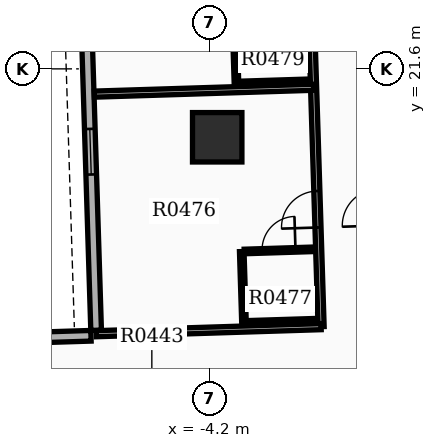
"""IFC4 building model, lengths in metres.
Left out: names, types, materials, properties, quantities, classifications, styles, units other than length and angle.
Written with IfcOpenShell. Run it as: python <this file> out.ifc"""

import sys

from ifc_helpers import new_model, si_unit, direction, frame, frame_2d, origin, origin_2d, place, context, subcontext, project, spatial, rectangle, extrude, element, fill, save


model = new_model("IFC4")
c1 = context("Model", 3, precision=1e-05, world=origin(), true_north=direction((0.0, 1.0)))
c2 = subcontext(c1, "Body", "Model", "MODEL_VIEW")
j1 = project(units=[si_unit("LENGTHUNIT", "METRE"), si_unit("PLANEANGLEUNIT", "RADIAN")], contexts=[c1])
p1 = place(None, origin())
s1 = spatial("IfcSite", under=j1, at=p1, CompositionType="ELEMENT")
p2 = place(p1, origin())
s2 = spatial("IfcBuilding", under=s1, at=p2, CompositionType="ELEMENT")
p3 = place(p2, frame((0.0, 0.0, 31.5)))
s3 = spatial("IfcBuildingStorey", under=s2, at=p3, CompositionType="ELEMENT", Elevation=31.5)
p4 = place(p3, frame((-4.0, 19.8, 0.0), z_axis=(0.0, 0.0, 1.0), x_axis=(1.0, 0.0, 0.0)))
e1 = element("IfcColumn", 1, at=p4, inside=s3, PredefinedType="COLUMN", context=c2, shape_type="SweptSolid", body=[
    extrude(rectangle(XDim=1.3, YDim=1.3, at=origin_2d()), origin(), (0.0, 0.0, 1.0), 3.9),
])
p5 = place(p3, frame((-7.817, 34.812, 0.0), z_axis=(0.0, 0.0, 1.0), x_axis=(0.031410322165, -0.999506574096, 0.0)))
e2 = element("IfcWall", 2, at=p5, inside=s3, PredefinedType="STANDARD", context=c2, shape_type="SweptSolid", body=[
    extrude(rectangle(XDim=20.1, YDim=0.28, at=frame_2d((10.05, 0.0))), origin(), (0.0, 0.0, 1.0), 2.91),
])
p6 = place(p5, frame((0.85, 0.0, 0.8)))
e3 = element("IfcOpeningElement", 3, at=p6, cuts=e2, PredefinedType="OPENING", context=c2, shape_type="SweptSolid", body=[
    extrude(rectangle(XDim=1.2, YDim=1.6, at=frame_2d((0.6, 0.8))), frame((0.0, 0.15, 0.0), z_axis=(0.0, -1.0, 0.0), x_axis=(1.0, 0.0, 0.0)), (0.0, 0.0, 1.0), 0.3),
])
p7 = place(p5, frame((4.05, 0.0, 0.8)))
e4 = element("IfcOpeningElement", 4, at=p7, cuts=e2, PredefinedType="OPENING", context=c2, shape_type="SweptSolid", body=[
    extrude(rectangle(XDim=1.2, YDim=1.6, at=frame_2d((0.6, 0.8))), frame((0.0, 0.15, 0.0), z_axis=(0.0, -1.0, 0.0), x_axis=(1.0, 0.0, 0.0)), (0.0, 0.0, 1.0), 0.3),
])
p8 = place(p5, frame((7.5, 0.0, 0.8)))
e5 = element("IfcOpeningElement", 5, at=p8, cuts=e2, PredefinedType="OPENING", context=c2, shape_type="SweptSolid", body=[
    extrude(rectangle(XDim=1.2, YDim=1.6, at=frame_2d((0.6, 0.8))), frame((0.0, 0.15, 0.0), z_axis=(0.0, -1.0, 0.0), x_axis=(1.0, 0.0, 0.0)), (0.0, 0.0, 1.0), 0.3),
])
p9 = place(p5, frame((10.7, 0.0, 0.8)))
e6 = element("IfcOpeningElement", 6, at=p9, cuts=e2, PredefinedType="OPENING", context=c2, shape_type="SweptSolid", body=[
    extrude(rectangle(XDim=1.2, YDim=1.6, at=frame_2d((0.6, 0.8))), frame((0.0, 0.15, 0.0), z_axis=(0.0, -1.0, 0.0), x_axis=(1.0, 0.0, 0.0)), (0.0, 0.0, 1.0), 0.3),
])
p10 = place(p5, frame((14.799, 0.0, 0.85)))
e7 = element("IfcOpeningElement", 7, at=p10, cuts=e2, PredefinedType="OPENING", context=c2, shape_type="SweptSolid", body=[
    extrude(rectangle(XDim=1.2, YDim=1.6, at=frame_2d((0.6, 0.8))), frame((0.0, 0.15, 0.0), z_axis=(0.0, -1.0, 0.0), x_axis=(1.0, 0.0, 0.0)), (0.0, 0.0, 1.0), 0.3),
])
p11 = place(p3, frame((-13.618, 14.379, 0.0), z_axis=(0.0, 0.0, 1.0), x_axis=(0.999507224741, 0.031389611199, 0.0)))
e8 = element("IfcWall", 8, at=p11, inside=s3, PredefinedType="STANDARD", context=c2, shape_type="SweptSolid", body=[
    extrude(rectangle(XDim=6.3, YDim=0.28, at=frame_2d((3.15, 0.0))), origin(), (0.0, 0.0, 1.0), 2.91),
])
p12 = place(p3, frame((0.333, 14.868, 0.0), z_axis=(0.0, 0.0, 1.0), x_axis=(-0.031416030536, 0.99950639469, 0.0)))
e9 = element("IfcWall", 9, at=p12, inside=s3, PredefinedType="PARTITIONING", context=c2, shape_type="SweptSolid", body=[
    extrude(rectangle(XDim=20.182, YDim=0.16, at=frame_2d((10.091, 0.0))), origin(), (0.0, 0.0, 1.0), 2.9),
])
p13 = place(p12, frame((2.61, 0.0, 0.0)))
e10 = element("IfcOpeningElement", 10, at=p13, cuts=e9, PredefinedType="OPENING", context=c2, shape_type="SweptSolid", body=[
    extrude(rectangle(XDim=0.96, YDim=2.15, at=frame_2d((0.48, 1.075))), frame((0.0, 0.09, 0.0), z_axis=(0.0, -1.0, 0.0), x_axis=(1.0, 0.0, 0.0)), (0.0, 0.0, 1.0), 0.18),
])
p14 = place(p12, frame((8.994, 0.0, 0.0)))
e11 = element("IfcOpeningElement", 11, at=p14, cuts=e9, PredefinedType="OPENING", context=c2, shape_type="SweptSolid", body=[
    extrude(rectangle(XDim=0.96, YDim=2.15, at=frame_2d((0.48, 1.075))), frame((0.0, 0.09, 0.0), z_axis=(0.0, -1.0, 0.0), x_axis=(1.0, 0.0, 0.0)), (0.0, 0.0, 1.0), 0.18),
])
p15 = place(p12, frame((18.93, 0.0, 0.0)))
e12 = element("IfcOpeningElement", 12, at=p15, cuts=e9, PredefinedType="OPENING", context=c2, shape_type="SweptSolid", body=[
    extrude(rectangle(XDim=0.96, YDim=2.15, at=frame_2d((0.48, 1.075))), frame((0.0, 0.09, 0.0), z_axis=(0.0, -1.0, 0.0), x_axis=(1.0, 0.0, 0.0)), (0.0, 0.0, 1.0), 0.18),
])
p16 = place(p3, frame((-1.266, 14.817, 0.0), z_axis=(0.0, 0.0, 1.0), x_axis=(-0.031403565719, 0.9995067864, 0.0)))
e13 = element("IfcWall", 13, at=p16, inside=s3, PredefinedType="PARTITIONING", context=c2, shape_type="SweptSolid", body=[
    extrude(rectangle(XDim=20.182, YDim=0.16, at=frame_2d((10.091, 0.0))), origin(), (0.0, 0.0, 1.0), 2.9),
])
p17 = place(p16, frame((2.61, 0.0, 0.0)))
e14 = element("IfcOpeningElement", 14, at=p17, cuts=e13, PredefinedType="OPENING", context=c2, shape_type="SweptSolid", body=[
    extrude(rectangle(XDim=0.96, YDim=2.15, at=frame_2d((0.48, 1.075))), frame((0.0, 0.09, 0.0), z_axis=(0.0, -1.0, 0.0), x_axis=(1.0, 0.0, 0.0)), (0.0, 0.0, 1.0), 0.18),
])
p18 = place(p16, frame((8.994, 0.0, 0.0)))
e15 = element("IfcOpeningElement", 15, at=p18, cuts=e13, PredefinedType="OPENING", context=c2, shape_type="SweptSolid", body=[
    extrude(rectangle(XDim=0.96, YDim=2.15, at=frame_2d((0.48, 1.075))), frame((0.0, 0.09, 0.0), z_axis=(0.0, -1.0, 0.0), x_axis=(1.0, 0.0, 0.0)), (0.0, 0.0, 1.0), 0.18),
])
p19 = place(p16, frame((18.93, 0.0, 0.0)))
e16 = element("IfcOpeningElement", 16, at=p19, cuts=e13, PredefinedType="OPENING", context=c2, shape_type="SweptSolid", body=[
    extrude(rectangle(XDim=0.96, YDim=2.15, at=frame_2d((0.48, 1.075))), frame((0.0, 0.09, 0.0), z_axis=(0.0, -1.0, 0.0), x_axis=(1.0, 0.0, 0.0)), (0.0, 0.0, 1.0), 0.18),
])
p20 = place(p3, frame((-1.266, 14.817, 0.0), z_axis=(0.0, 0.0, 1.0), x_axis=(-0.999507397699, -0.031384103385, 0.0)))
e17 = element("IfcWall", 17, at=p20, inside=s3, PredefinedType="PARTITIONING", context=c2, shape_type="SweptSolid", body=[
    extrude(rectangle(XDim=5.92, YDim=0.16, at=frame_2d((2.96, 0.0))), origin(), (0.0, 0.0, 1.0), 2.9),
])
p21 = place(p3, frame((-1.464, 21.116, 0.0), z_axis=(0.0, 0.0, 1.0), x_axis=(-0.999506032581, -0.031427548972, 0.0)))
e18 = element("IfcWall", 18, at=p21, inside=s3, PredefinedType="PARTITIONING", context=c2, shape_type="SweptSolid", body=[
    extrude(rectangle(XDim=5.772, YDim=0.16, at=frame_2d((2.886, 0.0))), origin(), (0.0, 0.0, 1.0), 2.9),
])
p22 = place(p3, frame((-3.289, 16.795, 0.0), z_axis=(0.0, 0.0, 1.0), x_axis=(0.999507221803, 0.031389704724, 0.0)))
e19 = element("IfcWall", 19, at=p22, inside=s3, PredefinedType="PARTITIONING", context=c2, shape_type="SweptSolid", body=[
    extrude(rectangle(XDim=1.82, YDim=0.12, at=frame_2d((0.91, 0.0))), origin(), (0.0, 0.0, 1.0), 2.9),
])
p23 = place(p22, frame((0.47, 0.0, 0.0)))
e20 = element("IfcOpeningElement", 20, at=p23, cuts=e19, PredefinedType="OPENING", context=c2, shape_type="SweptSolid", body=[
    extrude(rectangle(XDim=0.88, YDim=2.1, at=frame_2d((0.44, 1.05))), frame((0.0, 0.07, 0.0), z_axis=(0.0, -1.0, 0.0), x_axis=(1.0, 0.0, 0.0)), (0.0, 0.0, 1.0), 0.14),
])
p24 = place(p3, frame((-3.23, 14.916, 0.0), z_axis=(0.0, 0.0, 1.0), x_axis=(0.999507221803, 0.031389704724, 0.0)))
e21 = element("IfcWall", 21, at=p24, inside=s3, PredefinedType="PARTITIONING", context=c2, shape_type="SweptSolid", body=[
    extrude(rectangle(XDim=1.82, YDim=0.12, at=frame_2d((0.91, 0.0))), origin(), (0.0, 0.0, 1.0), 2.9),
])
p25 = place(p3, frame((-3.295, 14.914, 0.0), z_axis=(0.0, 0.0, 1.0), x_axis=(-0.031295563454, 0.999510173889, 0.0)))
e22 = element("IfcWall", 22, at=p25, inside=s3, PredefinedType="PARTITIONING", context=c2, shape_type="SweptSolid", body=[
    extrude(rectangle(XDim=1.88, YDim=0.12, at=frame_2d((0.94, 0.0))), origin(), (0.0, 0.0, 1.0), 2.9),
])
p26 = place(p3, frame((-3.428, 21.215, 0.0), z_axis=(0.0, 0.0, 1.0), x_axis=(0.999507221803, 0.031389704724, 0.0)))
e23 = element("IfcWall", 23, at=p26, inside=s3, PredefinedType="PARTITIONING", context=c2, shape_type="SweptSolid", body=[
    extrude(rectangle(XDim=1.82, YDim=0.12, at=frame_2d((0.91, 0.0))), origin(), (0.0, 0.0, 1.0), 2.9),
])
p27 = place(p3, frame((-3.493, 21.213, 0.0), z_axis=(0.0, 0.0, 1.0), x_axis=(-0.031425292588, 0.999506103526, 0.0)))
e24 = element("IfcWall", 24, at=p27, inside=s3, PredefinedType="PARTITIONING", context=c2, shape_type="SweptSolid", body=[
    extrude(rectangle(XDim=1.88, YDim=0.12, at=frame_2d((0.94, 0.0))), origin(), (0.0, 0.0, 1.0), 2.9),
])
p28 = place(p10, origin())
e25 = element("IfcWindow", 25, at=p28, inside=s3, PartitioningType="SINGLE_PANEL", PredefinedType="WINDOW", context=c2, shape_type="SweptSolid", body=[
    extrude(rectangle(XDim=1.2, YDim=1.6, at=frame_2d((0.6, 0.8))), frame((0.0, 0.03, 0.0), z_axis=(0.0, -1.0, 0.0), x_axis=(1.0, 0.0, 0.0)), (0.0, 0.0, 1.0), 0.06),
])
fill(e7, e25)
p29 = place(p17, origin())
e26 = element("IfcDoor", 26, at=p29, inside=s3, OperationType="SINGLE_SWING_LEFT", PredefinedType="DOOR", context=c2, shape_type="SweptSolid", body=[
    extrude(rectangle(XDim=0.96, YDim=2.15, at=frame_2d((0.48, 1.075))), frame((0.0, 0.025, 0.0), z_axis=(0.0, -1.0, 0.0), x_axis=(1.0, 0.0, 0.0)), (0.0, 0.0, 1.0), 0.05),
])
fill(e14, e26)
p30 = place(p23, origin())
e27 = element("IfcDoor", 27, at=p30, inside=s3, OperationType="SINGLE_SWING_RIGHT", PredefinedType="DOOR", context=c2, shape_type="SweptSolid", body=[
    extrude(rectangle(XDim=0.88, YDim=2.1, at=frame_2d((0.44, 1.05))), frame((0.0, 0.025, 0.0), z_axis=(0.0, -1.0, 0.0), x_axis=(1.0, 0.0, 0.0)), (0.0, 0.0, 1.0), 0.05),
])
fill(e20, e27)
save(model, sys.argv[1])
